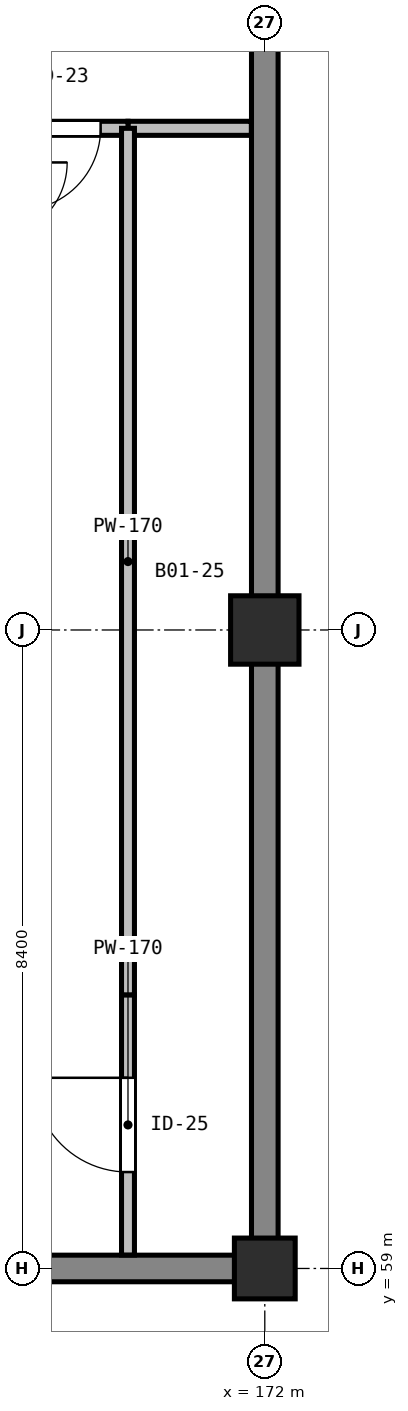
"""IFC4 building model, lengths in metres.
Left out: names, types, materials, properties, quantities, classifications, styles, units other than length and angle.
Written with IfcOpenShell. Run it as: python <this file> out.ifc"""

import sys

from ifc_helpers import new_model, si_unit, direction, frame, frame_2d, origin, origin_2d, place, context, subcontext, project, spatial, rectangle, extrude, element, fill, save


model = new_model("IFC4")
c1 = context("Model", 3, precision=1e-05, world=origin(), true_north=direction((0.0, 1.0)))
c2 = subcontext(c1, "Body", "Model", "MODEL_VIEW")
j1 = project(units=[si_unit("LENGTHUNIT", "METRE"), si_unit("PLANEANGLEUNIT", "RADIAN")], contexts=[c1])
p1 = place(None, origin())
s1 = spatial("IfcSite", under=j1, at=p1, CompositionType="ELEMENT")
p2 = place(p1, origin())
s2 = spatial("IfcBuilding", under=s1, at=p2, CompositionType="ELEMENT")
p3 = place(p2, frame((0.0, 0.0, -4.5)))
s3 = spatial("IfcBuildingStorey", under=s2, at=p3, CompositionType="ELEMENT", Elevation=-4.5)
for number, where, z_axis, x_axis in (
    (1, (172.0, 59.0, 0.0), (0.0, 0.0, 1.0), (1.0, 0.0, 0.0)),
    (2, (172.0, 67.4, 0.0), (0.0, 0.0, 1.0), (1.0, 0.0, 0.0)),
):
    element("IfcColumn", number, at=place(p3, frame(where, z_axis=z_axis, x_axis=x_axis)), inside=s3, PredefinedType="COLUMN", context=c2, shape_type="SweptSolid", body=[
        extrude(rectangle(XDim=0.8, YDim=0.8, at=origin_2d()), origin(), (0.0, 0.0, 1.0), 4.5),
    ])
p4 = place(p3, frame((172.0, 59.175, 0.0), z_axis=(0.0, 0.0, 1.0), x_axis=(0.0, 1.0, 0.0)))
e3 = element("IfcWall", 3, at=p4, inside=s3, PredefinedType="SOLIDWALL", context=c2, shape_type="SweptSolid", body=[
    extrude(rectangle(XDim=24.85, YDim=0.35, at=frame_2d((12.425, 0.0))), origin(), (0.0, 0.0, 1.0), 4.5),
])
p5 = place(p3, frame((151.825, 59.0, 0.0), z_axis=(0.0, 0.0, 1.0), x_axis=(1.0, 0.0, 0.0)))
e4 = element("IfcWall", 4, at=p5, inside=s3, PredefinedType="SOLIDWALL", context=c2, shape_type="SweptSolid", body=[
    extrude(rectangle(XDim=20.35, YDim=0.35, at=frame_2d((10.175, 0.0))), origin(), (0.0, 0.0, 1.0), 4.5),
])
p6 = place(p3, frame((172.0, 67.4, -1.2), z_axis=(0.0, 0.0, 1.0), x_axis=(1.0, 0.0, 0.0)))
e5 = element("IfcColumn", 5, at=p6, inside=s3, PredefinedType="COLUMN", context=c2, shape_type="SweptSolid", body=[
    extrude(rectangle(XDim=0.9, YDim=0.9, at=origin_2d()), origin(), (0.0, 0.0, 1.0), 1.2),
])
p7 = place(p3, frame((171.823, 74.0, 0.0), z_axis=(0.0, 0.0, 1.0), x_axis=(-1.0, 0.0, 0.0)))
e6 = element("IfcWall", 6, at=p7, inside=s3, PredefinedType="PARTITIONING", context=c2, shape_type="SweptSolid", body=[
    extrude(rectangle(XDim=1.623, YDim=0.185, at=frame_2d((0.812, 0.0))), origin(), (0.0, 0.0, 1.0), 4.175),
])
p8 = place(p3, frame((170.2, 74.0, 0.0), z_axis=(0.0, 0.0, 1.0), x_axis=(-1.0, 0.0, 0.0)))
e7 = element("IfcWall", 7, at=p8, inside=s3, PredefinedType="PARTITIONING", context=c2, shape_type="SweptSolid", body=[
    extrude(rectangle(XDim=1.8, YDim=0.185, at=frame_2d((0.9, 0.0))), origin(), (0.0, 0.0, 1.0), 4.035),
])
p9 = place(p8, frame((0.36, 0.0, 0.0)))
e8 = element("IfcOpeningElement", 8, at=p9, cuts=e7, PredefinedType="OPENING", context=c2, shape_type="SweptSolid", body=[
    extrude(rectangle(XDim=1.08, YDim=2.14, at=frame_2d((0.54, 1.07))), frame((0.0, 0.103, 0.0), z_axis=(0.0, -1.0, 0.0), x_axis=(1.0, 0.0, 0.0)), (0.0, 0.0, 1.0), 0.205),
])
p10 = place(p3, frame((170.2, 59.177, 0.0), z_axis=(0.0, 0.0, 1.0), x_axis=(0.0, 1.0, 0.0)))
e9 = element("IfcWall", 9, at=p10, inside=s3, PredefinedType="PARTITIONING", context=c2, shape_type="SweptSolid", body=[
    extrude(rectangle(XDim=3.423, YDim=0.17, at=frame_2d((1.711, 0.0))), origin(), (0.0, 0.0, 1.0), 4.175),
])
p11 = place(p10, frame((1.092, 0.0, 0.0)))
e10 = element("IfcOpeningElement", 10, at=p11, cuts=e9, PredefinedType="OPENING", context=c2, shape_type="SweptSolid", body=[
    extrude(rectangle(XDim=1.24, YDim=2.14, at=frame_2d((0.62, 1.07))), frame((0.0, 0.095, 0.0), z_axis=(0.0, -1.0, 0.0), x_axis=(1.0, 0.0, 0.0)), (0.0, 0.0, 1.0), 0.19),
])
p12 = place(p3, frame((170.2, 62.6, 0.0), z_axis=(0.0, 0.0, 1.0), x_axis=(0.0, 1.0, 0.0)))
e11 = element("IfcWall", 11, at=p12, inside=s3, PredefinedType="PARTITIONING", context=c2, shape_type="SweptSolid", body=[
    extrude(rectangle(XDim=11.4, YDim=0.17, at=frame_2d((5.7, 0.0))), origin(), (0.0, 0.0, 1.0), 3.835),
])
p13 = place(p9, origin())
e12 = element("IfcDoor", 12, at=p13, inside=s3, OperationType="SINGLE_SWING_RIGHT", PredefinedType="DOOR", context=c2, shape_type="SweptSolid", body=[
    extrude(rectangle(XDim=1.08, YDim=2.14, at=frame_2d((0.54, 1.07))), frame((0.0, 0.025, 0.0), z_axis=(0.0, -1.0, 0.0), x_axis=(1.0, 0.0, 0.0)), (0.0, 0.0, 1.0), 0.05),
])
fill(e8, e12)
p14 = place(p11, origin())
e13 = element("IfcDoor", 13, at=p14, inside=s3, OperationType="SINGLE_SWING_RIGHT", PredefinedType="DOOR", context=c2, shape_type="SweptSolid", body=[
    extrude(rectangle(XDim=1.24, YDim=2.14, at=frame_2d((0.62, 1.07))), frame((0.0, 0.025, 0.0), z_axis=(0.0, -1.0, 0.0), x_axis=(1.0, 0.0, 0.0)), (0.0, 0.0, 1.0), 0.05),
])
fill(e10, e13)
save(model, sys.argv[1])
